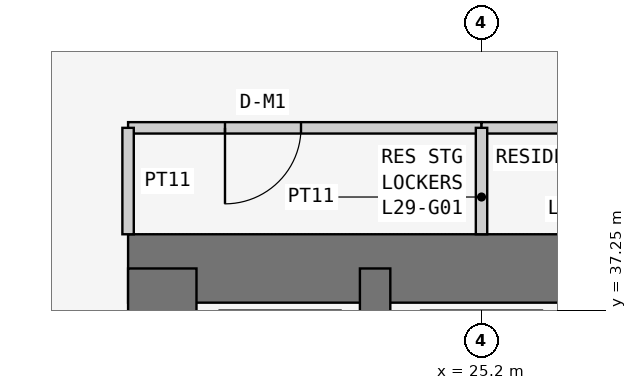
"""IFC4 building model, lengths in metres.
Left out: names, types, materials, properties, quantities, classifications, styles, units other than length and angle.
Written with IfcOpenShell. Run it as: python <this file> out.ifc"""

import sys

from ifc_helpers import new_model, si_unit, direction, frame, frame_2d, origin, place, context, subcontext, project, spatial, rectangle, extrude, element, fill, save


model = new_model("IFC4")
c1 = context("Model", 3, precision=1e-05, world=origin(), true_north=direction((0.0, 1.0)))
c2 = subcontext(c1, "Body", "Model", "MODEL_VIEW")
j1 = project(units=[si_unit("LENGTHUNIT", "METRE"), si_unit("PLANEANGLEUNIT", "RADIAN")], contexts=[c1])
p1 = place(None, origin())
s1 = spatial("IfcSite", under=j1, at=p1, CompositionType="ELEMENT")
p2 = place(p1, origin())
s2 = spatial("IfcBuilding", under=s1, at=p2, CompositionType="ELEMENT")
p3 = place(p2, frame((0.0, 0.0, 116.1)))
s3 = spatial("IfcBuildingStorey", under=s2, at=p3, CompositionType="ELEMENT", Elevation=116.1)
p4 = place(p3, frame((37.8, 37.8, 0.0), z_axis=(0.0, 0.0, 1.0), x_axis=(-1.0, 0.0, 0.0)))
e1 = element("IfcWall", 1, at=p4, inside=s3, PredefinedType="SHEAR", context=c2, shape_type="SweptSolid", body=[
    extrude(rectangle(XDim=17.25, YDim=0.9, at=frame_2d((8.625, 0.0))), origin(), (0.0, 0.0, 1.0), 3.6),
])
p5 = place(p3, frame((21.0, 37.8, 0.0), z_axis=(0.0, 0.0, 1.0), x_axis=(0.0, -1.0, 0.0)))
e2 = element("IfcWall", 2, at=p5, inside=s3, PredefinedType="SHEAR", context=c2, shape_type="SweptSolid", body=[
    extrude(rectangle(XDim=17.25, YDim=0.9, at=frame_2d((8.625, 0.0))), origin(), (0.0, 0.0, 1.0), 3.6),
])
p6 = place(p5, frame((5.4, 0.0, 0.0)))
e3 = element("IfcOpeningElement", 3, at=p6, cuts=e2, PredefinedType="OPENING", context=c2, shape_type="SweptSolid", body=[
    extrude(rectangle(XDim=1.2, YDim=2.1, at=frame_2d((0.6, 1.05))), frame((0.0, 0.46, 0.0), z_axis=(0.0, -1.0, 0.0), x_axis=(1.0, 0.0, 0.0)), (0.0, 0.0, 1.0), 0.92),
])
p7 = place(p3, frame((23.8, 34.6, 0.0), z_axis=(0.0, 0.0, 1.0), x_axis=(0.0, 1.0, 0.0)))
e4 = element("IfcWall", 4, at=p7, inside=s3, PredefinedType="SHEAR", context=c2, shape_type="SweptSolid", body=[
    extrude(rectangle(XDim=3.2, YDim=0.4, at=frame_2d((1.6, 0.0))), origin(), (0.0, 0.0, 1.0), 3.6),
])
p8 = place(p3, frame((25.2, 39.65, 0.0), z_axis=(0.0, 0.0, 1.0), x_axis=(-1.0, 0.0, 0.0)))
e5 = element("IfcWall", 5, at=p8, inside=s3, PredefinedType="PARTITIONING", context=c2, shape_type="SweptSolid", body=[
    extrude(rectangle(XDim=4.65, YDim=0.15, at=frame_2d((2.325, 0.0))), origin(), (0.0, 0.0, 1.0), 3.45),
])
p9 = place(p8, frame((2.375, 0.0, 0.0)))
e6 = element("IfcOpeningElement", 6, at=p9, cuts=e5, PredefinedType="OPENING", context=c2, shape_type="SweptSolid", body=[
    extrude(rectangle(XDim=1.0, YDim=2.1, at=frame_2d((0.5, 1.05))), frame((0.0, 0.085, 0.0), z_axis=(0.0, -1.0, 0.0), x_axis=(1.0, 0.0, 0.0)), (0.0, 0.0, 1.0), 0.17),
])
p10 = place(p3, frame((20.55, 39.65, 0.0), z_axis=(0.0, 0.0, 1.0), x_axis=(0.0, -1.0, 0.0)))
e7 = element("IfcWall", 7, at=p10, inside=s3, PredefinedType="PARTITIONING", context=c2, shape_type="SweptSolid", body=[
    extrude(rectangle(XDim=1.4, YDim=0.15, at=frame_2d((0.7, 0.0))), origin(), (0.0, 0.0, 1.0), 3.45),
])
p11 = place(p3, frame((32.5, 39.65, 0.0), z_axis=(0.0, 0.0, 1.0), x_axis=(-1.0, 0.0, 0.0)))
e8 = element("IfcWall", 8, at=p11, inside=s3, PredefinedType="PARTITIONING", context=c2, shape_type="SweptSolid", body=[
    extrude(rectangle(XDim=7.3, YDim=0.15, at=frame_2d((3.65, 0.0))), origin(), (0.0, 0.0, 1.0), 3.45),
])
p12 = place(p11, frame((2.6, 0.0, 0.0)))
e9 = element("IfcOpeningElement", 9, at=p12, cuts=e8, PredefinedType="OPENING", context=c2, shape_type="SweptSolid", body=[
    extrude(rectangle(XDim=1.0, YDim=2.1, at=frame_2d((0.5, 1.05))), frame((0.0, 0.085, 0.0), z_axis=(0.0, -1.0, 0.0), x_axis=(1.0, 0.0, 0.0)), (0.0, 0.0, 1.0), 0.17),
])
p13 = place(p3, frame((25.2, 38.25, 0.0), z_axis=(0.0, 0.0, 1.0), x_axis=(0.0, 1.0, 0.0)))
e10 = element("IfcWall", 10, at=p13, inside=s3, PredefinedType="PARTITIONING", context=c2, shape_type="SweptSolid", body=[
    extrude(rectangle(XDim=1.4, YDim=0.15, at=frame_2d((0.7, 0.0))), origin(), (0.0, 0.0, 1.0), 2.767),
])
p14 = place(p9, origin())
e11 = element("IfcDoor", 11, at=p14, inside=s3, OperationType="SINGLE_SWING_RIGHT", PredefinedType="DOOR", context=c2, shape_type="SweptSolid", body=[
    extrude(rectangle(XDim=1.0, YDim=2.1, at=frame_2d((0.5, 1.05))), frame((0.0, 0.025, 0.0), z_axis=(0.0, -1.0, 0.0), x_axis=(1.0, 0.0, 0.0)), (0.0, 0.0, 1.0), 0.05),
])
fill(e6, e11)
save(model, sys.argv[1])
